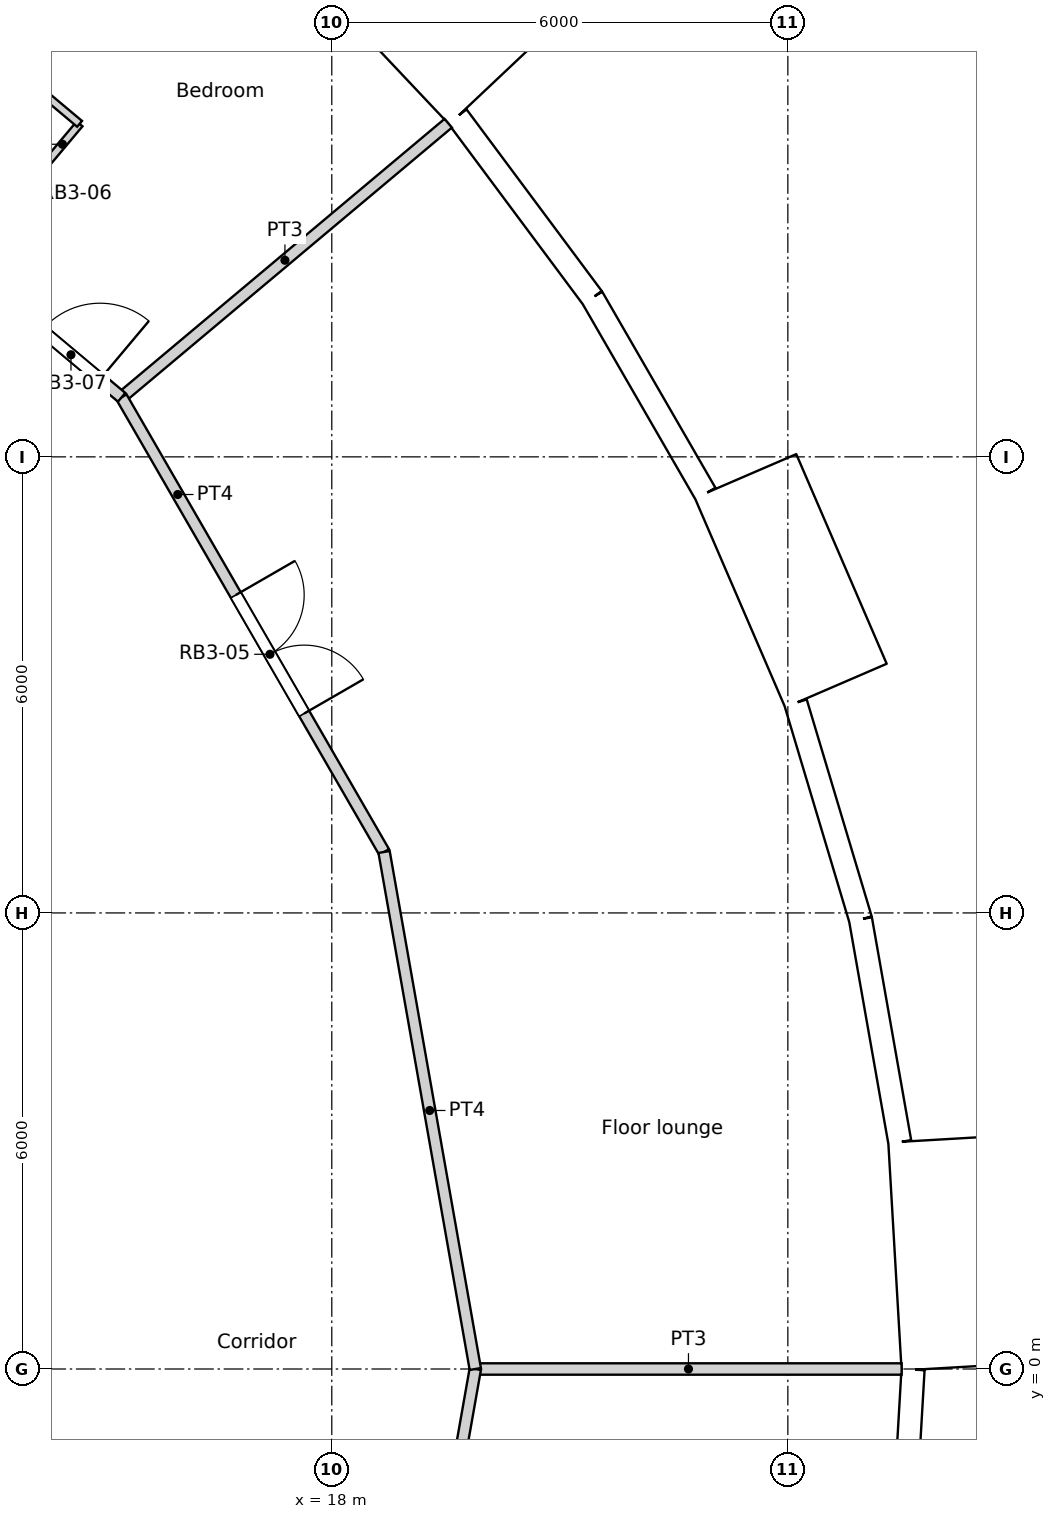
"""IFC4 building model, lengths in metres.
Left out: names, types, materials, properties, quantities, classifications, styles, units other than length and angle.
Written with IfcOpenShell. Run it as: python <this file> out.ifc"""

import sys

from ifc_helpers import new_model, si_unit, direction, frame, frame_2d, origin, origin_2d, place, context, subcontext, project, spatial, rectangle, circle, extrude, element, fill, save


model = new_model("IFC4")
c1 = context("Model", 3, precision=1e-05, world=origin(), true_north=direction((0.0, 1.0)))
c2 = subcontext(c1, "Body", "Model", "MODEL_VIEW")
j1 = project(units=[si_unit("LENGTHUNIT", "METRE"), si_unit("PLANEANGLEUNIT", "RADIAN")], contexts=[c1])
p1 = place(None, origin())
s1 = spatial("IfcSite", under=j1, at=p1, CompositionType="ELEMENT")
p2 = place(p1, origin())
s2 = spatial("IfcBuilding", under=s1, at=p2, CompositionType="ELEMENT")
p3 = place(p2, frame((0.0, 0.0, 147.6)))
s3 = spatial("IfcBuildingStorey", under=s2, at=p3, CompositionType="ELEMENT", Elevation=147.6)
for number, where, z_axis, x_axis in (
    (1, (24.548, 0.0, 0.0), (0.0, 0.0, 1.0), (1.0, 0.0, 0.0)),
    (2, (23.886, 5.661, 0.0), (0.0, 0.0, 1.0), (1.0, 0.0, 0.0)),
    (3, (21.937, 11.017, 0.0), (0.0, 0.0, 1.0), (1.0, 0.0, 0.0)),
    (4, (18.805, 15.779, 0.0), (0.0, 0.0, 1.0), (1.0, 0.0, 0.0)),
):
    element("IfcColumn", number, at=place(p3, frame(where, z_axis=z_axis, x_axis=x_axis)), inside=s3, PredefinedType="COLUMN", context=c2, shape_type="SweptSolid", body=[
        extrude(circle(Radius=0.6, at=origin_2d()), origin(), (0.0, 0.0, 1.0), 3.6),
    ])
for number, where, z_axis, x_axis in (
    (5, (18.822, 0.0, 0.0), (0.0, 0.0, 1.0), (1.0, 0.0, 0.0)),
    (6, (17.986, 5.548, 0.0), (0.0, 0.0, 1.0), (1.0, 0.0, 0.0)),
    (7, (15.552, 10.603, 0.0), (0.0, 0.0, 1.0), (1.0, 0.0, 0.0)),
):
    element("IfcColumn", number, at=place(p3, frame(where, z_axis=z_axis, x_axis=x_axis)), inside=s3, PredefinedType="COLUMN", context=c2, shape_type="SweptSolid", body=[
        extrude(circle(Radius=0.65, at=origin_2d()), origin(), (0.0, 0.0, 1.0), 3.6),
    ])
p4 = place(p3, frame((26.222, 0.025, -0.3), z_axis=(0.0, 0.0, 1.0), x_axis=(-0.058106596105, 0.998310384344, 0.0)))
e8 = element("IfcWall", 8, at=p4, inside=s3, PredefinedType="ELEMENTEDWALL", context=c2, shape_type="SweptSolid", body=[
    extrude(rectangle(XDim=3.0, YDim=1.45, at=frame_2d((1.5, 0.0))), origin(), (0.0, 0.0, 1.0), 3.6),
])
p5 = place(p4, frame((1.5, 0.0, 1.85)))
e9 = element("IfcOpeningElement", 9, at=p5, cuts=e8, PredefinedType="OPENING", context=c2, shape_type="SweptSolid", body=[
    extrude(circle(Radius=0.9, at=origin_2d()), frame((0.0, 0.735, 0.0), z_axis=(0.0, -1.0, 0.0), x_axis=(1.0, 0.0, 0.0)), (0.0, 0.0, 1.0), 1.47),
])
p6 = place(p3, frame((25.472, 2.987, 0.0), z_axis=(0.0, 0.0, 1.0), x_axis=(-0.173686952598, 0.984800915159, 0.0)))
e10 = element("IfcWall", 10, at=p6, inside=s3, PredefinedType="SOLIDWALL", context=c2, shape_type="SweptSolid", body=[
    extrude(rectangle(XDim=2.973, YDim=0.3, at=frame_2d((1.486, 0.0))), origin(), (0.0, 0.0, 1.0), 3.3),
])
p7 = place(p6, frame((1.486, 0.0, 1.55)))
e11 = element("IfcOpeningElement", 11, at=p7, cuts=e10, PredefinedType="OPENING", context=c2, shape_type="SweptSolid", body=[
    extrude(circle(Radius=0.9, at=origin_2d()), frame((0.0, 0.16, 0.0), z_axis=(0.0, -1.0, 0.0), x_axis=(1.0, 0.0, 0.0)), (0.0, 0.0, 1.0), 0.32),
])
p8 = place(p3, frame((24.956, 5.915, 0.0), z_axis=(0.0, 0.0, 1.0), x_axis=(-0.286782750849, 0.957995643944, 0.0)))
e12 = element("IfcWall", 12, at=p8, inside=s3, PredefinedType="SOLIDWALL", context=c2, shape_type="SweptSolid", body=[
    extrude(rectangle(XDim=2.973, YDim=0.3, at=frame_2d((1.486, 0.0))), origin(), (0.0, 0.0, 1.0), 3.3),
])
p9 = place(p8, frame((1.486, 0.0, 1.55)))
e13 = element("IfcOpeningElement", 13, at=p9, cuts=e12, PredefinedType="OPENING", context=c2, shape_type="SweptSolid", body=[
    extrude(circle(Radius=0.9, at=origin_2d()), frame((0.0, 0.16, 0.0), z_axis=(0.0, -1.0, 0.0), x_axis=(1.0, 0.0, 0.0)), (0.0, 0.0, 1.0), 0.32),
])
p10 = place(p3, frame((24.632, 8.992, -0.3), z_axis=(0.0, 0.0, 1.0), x_axis=(-0.396079003245, 0.918216435917, 0.0)))
e14 = element("IfcWall", 14, at=p10, inside=s3, PredefinedType="ELEMENTEDWALL", context=c2, shape_type="SweptSolid", body=[
    extrude(rectangle(XDim=3.0, YDim=1.45, at=frame_2d((1.5, 0.0))), origin(), (0.0, 0.0, 1.0), 3.6),
])
p11 = place(p10, frame((1.5, 0.0, 1.85)))
e15 = element("IfcOpeningElement", 15, at=p11, cuts=e14, PredefinedType="OPENING", context=c2, shape_type="SweptSolid", body=[
    extrude(circle(Radius=0.9, at=origin_2d()), frame((0.0, 0.735, 0.0), z_axis=(0.0, -1.0, 0.0), x_axis=(1.0, 0.0, 0.0)), (0.0, 0.0, 1.0), 1.47),
])
p12 = place(p3, frame((22.915, 11.519, 0.0), z_axis=(0.0, 0.0, 1.0), x_axis=(-0.499954672104, 0.866051572276, 0.0)))
e16 = element("IfcWall", 16, at=p12, inside=s3, PredefinedType="SOLIDWALL", context=c2, shape_type="SweptSolid", body=[
    extrude(rectangle(XDim=2.973, YDim=0.3, at=frame_2d((1.486, 0.0))), origin(), (0.0, 0.0, 1.0), 3.3),
])
p13 = place(p12, frame((1.486, 0.0, 1.55)))
e17 = element("IfcOpeningElement", 17, at=p13, cuts=e16, PredefinedType="OPENING", context=c2, shape_type="SweptSolid", body=[
    extrude(circle(Radius=0.9, at=origin_2d()), frame((0.0, 0.16, 0.0), z_axis=(0.0, -1.0, 0.0), x_axis=(1.0, 0.0, 0.0)), (0.0, 0.0, 1.0), 0.32),
])
p14 = place(p3, frame((21.428, 14.094, 0.0), z_axis=(0.0, 0.0, 1.0), x_axis=(-0.597197580538, 0.80209416517, 0.0)))
e18 = element("IfcWall", 18, at=p14, inside=s3, PredefinedType="SOLIDWALL", context=c2, shape_type="SweptSolid", body=[
    extrude(rectangle(XDim=2.973, YDim=0.3, at=frame_2d((1.486, 0.0))), origin(), (0.0, 0.0, 1.0), 3.3),
])
p15 = place(p14, frame((1.486, 0.0, 1.55)))
e19 = element("IfcOpeningElement", 19, at=p15, cuts=e18, PredefinedType="OPENING", context=c2, shape_type="SweptSolid", body=[
    extrude(circle(Radius=0.9, at=origin_2d()), frame((0.0, 0.16, 0.0), z_axis=(0.0, -1.0, 0.0), x_axis=(1.0, 0.0, 0.0)), (0.0, 0.0, 1.0), 0.32),
])
p16 = place(p3, frame((20.071, 16.874, -0.3), z_axis=(0.0, 0.0, 1.0), x_axis=(-0.686217177108, 0.727396718334, 0.0)))
e20 = element("IfcWall", 20, at=p16, inside=s3, PredefinedType="ELEMENTEDWALL", context=c2, shape_type="SweptSolid", body=[
    extrude(rectangle(XDim=3.0, YDim=1.45, at=frame_2d((1.5, 0.0))), origin(), (0.0, 0.0, 1.0), 3.6),
])
p17 = place(p16, frame((1.5, 0.0, 1.85)))
e21 = element("IfcOpeningElement", 21, at=p17, cuts=e20, PredefinedType="OPENING", context=c2, shape_type="SweptSolid", body=[
    extrude(circle(Radius=0.9, at=origin_2d()), frame((0.0, 0.735, 0.0), z_axis=(0.0, -1.0, 0.0), x_axis=(1.0, 0.0, 0.0)), (0.0, 0.0, 1.0), 1.47),
])
p18 = place(p3, frame((25.474, -2.978, 0.0), z_axis=(0.0, 0.0, 1.0), x_axis=(0.058139540521, 0.998308466271, 0.0)))
e22 = element("IfcWall", 22, at=p18, inside=s3, PredefinedType="SOLIDWALL", context=c2, shape_type="SweptSolid", body=[
    extrude(rectangle(XDim=2.973, YDim=0.3, at=frame_2d((1.487, 0.0))), origin(), (0.0, 0.0, 1.0), 3.3),
])
p19 = place(p18, frame((1.486, 0.0, 1.55)))
e23 = element("IfcOpeningElement", 23, at=p19, cuts=e22, PredefinedType="OPENING", context=c2, shape_type="SweptSolid", body=[
    extrude(circle(Radius=0.9, at=origin_2d()), frame((0.0, 0.16, 0.0), z_axis=(0.0, -1.0, 0.0), x_axis=(1.0, 0.0, 0.0)), (0.0, 0.0, 1.0), 0.32),
])
p20 = place(p3, frame((15.235, 12.784, 0.0), z_axis=(0.0, 0.0, 1.0), x_axis=(0.499914202267, -0.866074933462, 0.0)))
e24 = element("IfcWall", 24, at=p20, inside=s3, PredefinedType="PARTITIONING", context=c2, shape_type="SweptSolid", body=[
    extrude(rectangle(XDim=6.907, YDim=0.15, at=frame_2d((3.454, 0.0))), origin(), (0.0, 0.0, 1.0), 3.3),
])
p21 = place(p20, frame((3.004, 0.0, 0.0)))
e25 = element("IfcOpeningElement", 25, at=p21, cuts=e24, PredefinedType="OPENING", context=c2, shape_type="SweptSolid", body=[
    extrude(rectangle(XDim=1.8, YDim=2.1, at=frame_2d((0.9, 1.05))), frame((0.0, 0.075, 0.0), z_axis=(0.0, -1.0, 0.0), x_axis=(1.0, 0.0, 0.0)), (0.0, 0.0, 1.0), 0.15),
])
p22 = place(p3, frame((18.688, 6.802, 0.0), z_axis=(0.0, 0.0, 1.0), x_axis=(0.173728873845, -0.98479352069, 0.0)))
e26 = element("IfcWall", 26, at=p22, inside=s3, PredefinedType="PARTITIONING", context=c2, shape_type="SweptSolid", body=[
    extrude(rectangle(XDim=6.907, YDim=0.15, at=frame_2d((3.454, 0.0))), origin(), (0.0, 0.0, 1.0), 3.3),
])
p23 = place(p3, frame((9.943, 17.222, 0.0), z_axis=(0.0, 0.0, 1.0), x_axis=(0.766192104565, -0.642611592567, 0.0)))
e27 = element("IfcWall", 27, at=p23, inside=s3, PredefinedType="PARTITIONING", context=c2, shape_type="SweptSolid", body=[
    extrude(rectangle(XDim=6.906, YDim=0.15, at=frame_2d((3.453, 0.0))), origin(), (0.0, 0.0, 1.0), 3.3),
])
p24 = place(p23, frame((5.537, 0.0, 0.0)))
e28 = element("IfcOpeningElement", 28, at=p24, cuts=e27, PredefinedType="OPENING", context=c2, shape_type="SweptSolid", body=[
    extrude(rectangle(XDim=1.0, YDim=2.1, at=frame_2d((0.5, 1.05))), frame((0.0, 0.075, 0.0), z_axis=(0.0, -1.0, 0.0), x_axis=(1.0, 0.0, 0.0)), (0.0, 0.0, 1.0), 0.15),
])
p25 = place(p3, frame((18.688, -6.802, 0.0), z_axis=(0.0, 0.0, 1.0), x_axis=(0.173728873845, 0.98479352069, 0.0)))
e29 = element("IfcWall", 29, at=p25, inside=s3, PredefinedType="PARTITIONING", context=c2, shape_type="SweptSolid", body=[
    extrude(rectangle(XDim=6.907, YDim=0.15, at=frame_2d((3.454, 0.0))), origin(), (0.0, 0.0, 1.0), 3.3),
])
p26 = place(p25, frame((2.553, 0.0, 0.0)))
e30 = element("IfcOpeningElement", 30, at=p26, cuts=e29, PredefinedType="OPENING", context=c2, shape_type="SweptSolid", body=[
    extrude(rectangle(XDim=1.8, YDim=2.1, at=frame_2d((0.9, 1.05))), frame((0.0, 0.075, 0.0), z_axis=(0.0, -1.0, 0.0), x_axis=(1.0, 0.0, 0.0)), (0.0, 0.0, 1.0), 0.15),
])
p27 = place(p3, frame((15.235, 12.784, 0.0), z_axis=(0.0, 0.0, 1.0), x_axis=(0.76609059793, 0.642732600514, 0.0)))
e31 = element("IfcWall", 31, at=p27, inside=s3, PredefinedType="PARTITIONING", context=c2, shape_type="SweptSolid", body=[
    extrude(rectangle(XDim=5.609, YDim=0.15, at=frame_2d((2.804, 0.0))), origin(), (0.0, 0.0, 1.0), 3.3),
])
p28 = place(p3, frame((19.888, 0.0, 0.0), z_axis=(0.0, 0.0, 1.0), x_axis=(1.0, 0.0, 0.0)))
e32 = element("IfcWall", 32, at=p28, inside=s3, PredefinedType="PARTITIONING", context=c2, shape_type="SweptSolid", body=[
    extrude(rectangle(XDim=5.609, YDim=0.15, at=frame_2d((2.805, 0.0))), origin(), (0.0, 0.0, 1.0), 3.3),
])
p29 = place(p3, frame((13.139, 14.542, 0.0), z_axis=(0.0, 0.0, 1.0), x_axis=(0.642731657745, 0.766091388891, 0.0)))
e33 = element("IfcWall", 33, at=p29, inside=s3, PredefinedType="PARTITIONING", context=c2, shape_type="SweptSolid", body=[
    extrude(rectangle(XDim=2.401, YDim=0.1, at=frame_2d((1.2, 0.0))), origin(), (0.0, 0.0, 1.0), 3.3),
])
p30 = place(p29, frame((0.75, 0.0, 0.0)))
e34 = element("IfcOpeningElement", 34, at=p30, cuts=e33, PredefinedType="OPENING", context=c2, shape_type="SweptSolid", body=[
    extrude(rectangle(XDim=0.9, YDim=2.04, at=frame_2d((0.45, 1.02))), frame((0.0, 0.05, 0.0), z_axis=(0.0, -1.0, 0.0), x_axis=(1.0, 0.0, 0.0)), (0.0, 0.0, 1.0), 0.1),
])
p31 = place(p3, frame((13.151, 17.665, 0.0), z_axis=(0.0, 0.0, 1.0), x_axis=(0.766224532916, -0.642572925945, 0.0)))
e35 = element("IfcWall", 35, at=p31, inside=s3, PredefinedType="PARTITIONING", context=c2, shape_type="SweptSolid", body=[
    extrude(rectangle(XDim=1.998, YDim=0.1, at=frame_2d((0.999, 0.0))), origin(), (0.0, 0.0, 1.0), 3.3),
])
p32 = place(p5, origin())
e36 = element("IfcWindow", 36, at=p32, inside=s3, PartitioningType="SINGLE_PANEL", PredefinedType="WINDOW", context=c2, shape_type="SweptSolid", body=[
    extrude(circle(Radius=0.9, at=origin_2d()), frame((0.0, 0.695, 0.0), z_axis=(0.0, -1.0, 0.0), x_axis=(1.0, 0.0, 0.0)), (0.0, 0.0, 1.0), 0.1),
])
fill(e9, e36)
p33 = place(p7, origin())
e37 = element("IfcWindow", 37, at=p33, inside=s3, PartitioningType="SINGLE_PANEL", PredefinedType="WINDOW", context=c2, shape_type="SweptSolid", body=[
    extrude(circle(Radius=0.9, at=origin_2d()), frame((0.0, 0.12, 0.0), z_axis=(0.0, -1.0, 0.0), x_axis=(1.0, 0.0, 0.0)), (0.0, 0.0, 1.0), 0.1),
])
fill(e11, e37)
p34 = place(p9, origin())
e38 = element("IfcWindow", 38, at=p34, inside=s3, PartitioningType="SINGLE_PANEL", PredefinedType="WINDOW", context=c2, shape_type="SweptSolid", body=[
    extrude(circle(Radius=0.9, at=origin_2d()), frame((0.0, 0.12, 0.0), z_axis=(0.0, -1.0, 0.0), x_axis=(1.0, 0.0, 0.0)), (0.0, 0.0, 1.0), 0.1),
])
fill(e13, e38)
p35 = place(p11, origin())
e39 = element("IfcWindow", 39, at=p35, inside=s3, PartitioningType="SINGLE_PANEL", PredefinedType="WINDOW", context=c2, shape_type="SweptSolid", body=[
    extrude(circle(Radius=0.9, at=origin_2d()), frame((0.0, 0.695, 0.0), z_axis=(0.0, -1.0, 0.0), x_axis=(1.0, 0.0, 0.0)), (0.0, 0.0, 1.0), 0.1),
])
fill(e15, e39)
p36 = place(p13, origin())
e40 = element("IfcWindow", 40, at=p36, inside=s3, PartitioningType="SINGLE_PANEL", PredefinedType="WINDOW", context=c2, shape_type="SweptSolid", body=[
    extrude(circle(Radius=0.9, at=origin_2d()), frame((0.0, 0.12, 0.0), z_axis=(0.0, -1.0, 0.0), x_axis=(1.0, 0.0, 0.0)), (0.0, 0.0, 1.0), 0.1),
])
fill(e17, e40)
p37 = place(p15, origin())
e41 = element("IfcWindow", 41, at=p37, inside=s3, PartitioningType="SINGLE_PANEL", PredefinedType="WINDOW", context=c2, shape_type="SweptSolid", body=[
    extrude(circle(Radius=0.9, at=origin_2d()), frame((0.0, 0.12, 0.0), z_axis=(0.0, -1.0, 0.0), x_axis=(1.0, 0.0, 0.0)), (0.0, 0.0, 1.0), 0.1),
])
fill(e19, e41)
p38 = place(p17, origin())
e42 = element("IfcWindow", 42, at=p38, inside=s3, PartitioningType="SINGLE_PANEL", PredefinedType="WINDOW", context=c2, shape_type="SweptSolid", body=[
    extrude(circle(Radius=0.9, at=origin_2d()), frame((0.0, 0.695, 0.0), z_axis=(0.0, -1.0, 0.0), x_axis=(1.0, 0.0, 0.0)), (0.0, 0.0, 1.0), 0.1),
])
fill(e21, e42)
p39 = place(p19, origin())
e43 = element("IfcWindow", 43, at=p39, inside=s3, PartitioningType="SINGLE_PANEL", PredefinedType="WINDOW", context=c2, shape_type="SweptSolid", body=[
    extrude(circle(Radius=0.9, at=origin_2d()), frame((0.0, 0.12, 0.0), z_axis=(0.0, -1.0, 0.0), x_axis=(1.0, 0.0, 0.0)), (0.0, 0.0, 1.0), 0.1),
])
fill(e23, e43)
p40 = place(p21, origin())
e44 = element("IfcDoor", 44, at=p40, inside=s3, OperationType="DOUBLE_DOOR_SINGLE_SWING", PredefinedType="DOOR", context=c2, shape_type="SweptSolid", body=[
    extrude(rectangle(XDim=1.8, YDim=2.1, at=frame_2d((0.9, 1.05))), frame((0.0, 0.025, 0.0), z_axis=(0.0, -1.0, 0.0), x_axis=(1.0, 0.0, 0.0)), (0.0, 0.0, 1.0), 0.05),
])
fill(e25, e44)
p41 = place(p24, origin())
e45 = element("IfcDoor", 45, at=p41, inside=s3, OperationType="SINGLE_SWING_RIGHT", PredefinedType="DOOR", context=c2, shape_type="SweptSolid", body=[
    extrude(rectangle(XDim=1.0, YDim=2.1, at=frame_2d((0.5, 1.05))), frame((0.0, 0.025, 0.0), z_axis=(0.0, -1.0, 0.0), x_axis=(1.0, 0.0, 0.0)), (0.0, 0.0, 1.0), 0.05),
])
fill(e28, e45)
save(model, sys.argv[1])
